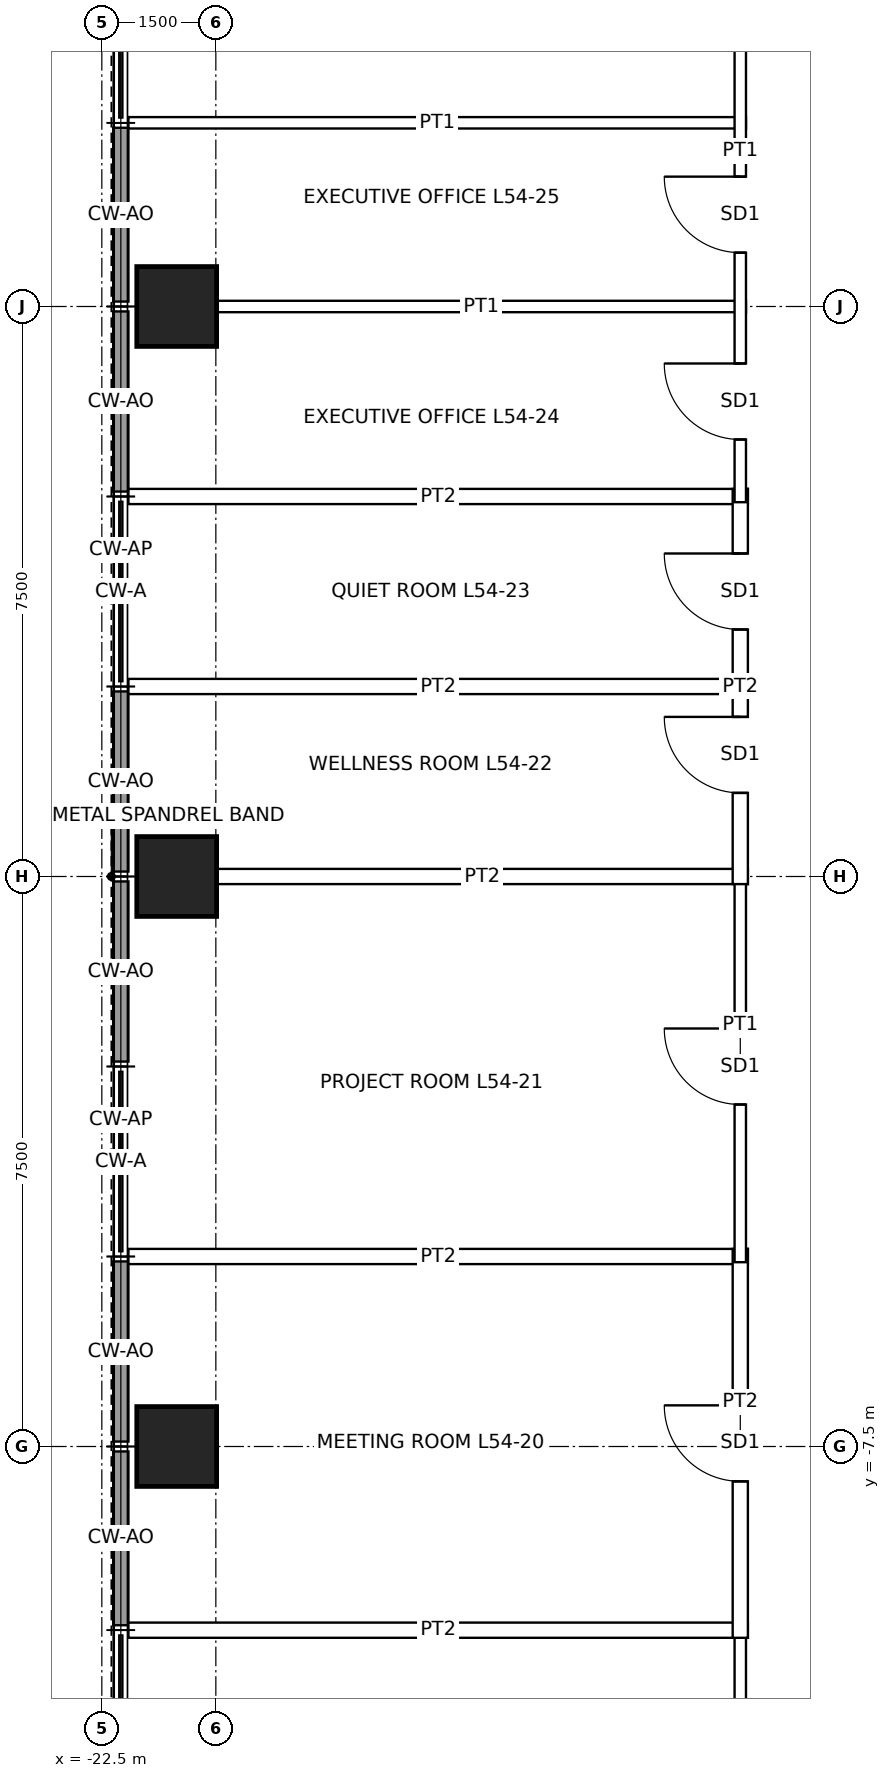
"""IFC4 building model, lengths in metres.
Left out: names, types, materials, properties, quantities, classifications, styles, units other than length and angle.
Written with IfcOpenShell. Run it as: python <this file> out.ifc"""

import sys

from ifc_helpers import new_model, si_unit, direction, frame, frame_2d, origin, origin_2d, place, context, subcontext, project, spatial, rectangle, hollow_rectangle, extrude, element, fill, save


model = new_model("IFC4")
c1 = context("Model", 3, precision=1e-05, world=origin(), true_north=direction((0.0, 1.0)))
c2 = subcontext(c1, "Body", "Model", "MODEL_VIEW")
j1 = project(units=[si_unit("LENGTHUNIT", "METRE"), si_unit("PLANEANGLEUNIT", "RADIAN")], contexts=[c1])
p1 = place(None, origin())
s1 = spatial("IfcSite", under=j1, at=p1, CompositionType="ELEMENT")
p2 = place(p1, origin())
s2 = spatial("IfcBuilding", under=s1, at=p2, CompositionType="ELEMENT")
p3 = place(p2, frame((0.0, 0.0, 249.9)))
s3 = spatial("IfcBuildingStorey", under=s2, at=p3, CompositionType="ELEMENT", Elevation=249.9)
for number, where, z_axis, x_axis in (
    (1, (-21.515, -7.5, 0.0), (0.0, 0.0, 1.0), (1.0, 0.0, 0.0)),
    (2, (-21.515, 0.0, 0.0), (0.0, 0.0, 1.0), (1.0, 0.0, 0.0)),
    (3, (-21.515, 7.5, 0.0), (0.0, 0.0, 1.0), (1.0, 0.0, 0.0)),
):
    element("IfcColumn", number, at=place(p3, frame(where, z_axis=z_axis, x_axis=x_axis)), inside=s3, PredefinedType="COLUMN", context=c2, shape_type="SweptSolid", body=[
        extrude(hollow_rectangle(XDim=1.05, YDim=1.05, WallThickness=0.07, at=origin_2d()), origin(), (0.0, 0.0, 1.0), 4.0),
    ])
p4 = place(p3, frame((-22.25, -9.852, 0.0), z_axis=(0.0, 0.0, 1.0), x_axis=(0.0, 1.0, 0.0)))
e4 = element("IfcWall", 4, at=p4, inside=s3, PredefinedType="SOLIDWALL", context=c2, shape_type="SweptSolid", body=[
    extrude(rectangle(XDim=2.287, YDim=0.2, at=frame_2d((1.144, 0.0))), origin(), (0.0, 0.0, 1.0), 3.75),
])
for number, where, z_axis, x_axis in (
    (5, (-22.25, -7.435, 0.0), (0.0, 0.0, 1.0), (0.0, 1.0, 0.0)),
    (6, (-22.25, -2.435, 0.0), (0.0, 0.0, 1.0), (0.0, 1.0, 0.0)),
    (7, (-22.25, 0.065, 0.0), (0.0, 0.0, 1.0), (0.0, 1.0, 0.0)),
    (8, (-22.25, 5.065, 0.0), (0.0, 0.0, 1.0), (0.0, 1.0, 0.0)),
):
    element("IfcWall", number, at=place(p3, frame(where, z_axis=z_axis, x_axis=x_axis)), inside=s3, PredefinedType="SOLIDWALL", context=c2, shape_type="SweptSolid", body=[
        extrude(rectangle(XDim=2.37, YDim=0.2, at=frame_2d((1.185, 0.0))), origin(), (0.0, 0.0, 1.0), 3.75),
    ])
p5 = place(p3, frame((-22.25, 7.565, 0.0), z_axis=(0.0, 0.0, 1.0), x_axis=(0.0, 1.0, 0.0)))
e9 = element("IfcWall", 9, at=p5, inside=s3, PredefinedType="SOLIDWALL", context=c2, shape_type="SweptSolid", body=[
    extrude(rectangle(XDim=2.287, YDim=0.2, at=frame_2d((1.144, 0.0))), origin(), (0.0, 0.0, 1.0), 3.75),
])
for number, where, z_axis, x_axis in (
    (10, (-22.15, -9.917, 0.0), (0.0, 0.0, 1.0), (1.0, 0.0, 0.0)),
    (11, (-22.15, -5.0, 0.0), (0.0, 0.0, 1.0), (1.0, 0.0, 0.0)),
):
    element("IfcWall", number, at=place(p3, frame(where, z_axis=z_axis, x_axis=x_axis)), inside=s3, PredefinedType="PARTITIONING", context=c2, shape_type="SweptSolid", body=[
        extrude(rectangle(XDim=8.15, YDim=0.2, at=frame_2d((4.075, 0.0))), origin(), (0.0, 0.0, 1.0), 3.75),
    ])
p6 = place(p3, frame((-20.99, 0.0, 0.0), z_axis=(0.0, 0.0, 1.0), x_axis=(1.0, 0.0, 0.0)))
e12 = element("IfcWall", 12, at=p6, inside=s3, PredefinedType="PARTITIONING", context=c2, shape_type="SweptSolid", body=[
    extrude(rectangle(XDim=6.99, YDim=0.2, at=frame_2d((3.495, 0.0))), origin(), (0.0, 0.0, 1.0), 3.75),
])
for number, where, z_axis, x_axis in (
    (13, (-22.15, 2.5, 0.0), (0.0, 0.0, 1.0), (1.0, 0.0, 0.0)),
    (14, (-22.15, 5.0, 0.0), (0.0, 0.0, 1.0), (1.0, 0.0, 0.0)),
):
    element("IfcWall", number, at=place(p3, frame(where, z_axis=z_axis, x_axis=x_axis)), inside=s3, PredefinedType="PARTITIONING", context=c2, shape_type="SweptSolid", body=[
        extrude(rectangle(XDim=8.15, YDim=0.2, at=frame_2d((4.075, 0.0))), origin(), (0.0, 0.0, 1.0), 3.75),
    ])
p7 = place(p3, frame((-20.99, 7.5, 0.0), z_axis=(0.0, 0.0, 1.0), x_axis=(1.0, 0.0, 0.0)))
e15 = element("IfcWall", 15, at=p7, inside=s3, PredefinedType="PARTITIONING", context=c2, shape_type="SweptSolid", body=[
    extrude(rectangle(XDim=6.965, YDim=0.15, at=frame_2d((3.482, 0.0))), origin(), (0.0, 0.0, 1.0), 3.75),
])
p8 = place(p3, frame((-22.15, 9.917, 0.0), z_axis=(0.0, 0.0, 1.0), x_axis=(1.0, 0.0, 0.0)))
e16 = element("IfcWall", 16, at=p8, inside=s3, PredefinedType="PARTITIONING", context=c2, shape_type="SweptSolid", body=[
    extrude(rectangle(XDim=8.125, YDim=0.15, at=frame_2d((4.062, 0.0))), origin(), (0.0, 0.0, 1.0), 3.75),
])
p9 = place(p3, frame((-14.1, -14.175, 0.0), z_axis=(0.0, 0.0, 1.0), x_axis=(0.0, 1.0, 0.0)))
e17 = element("IfcWall", 17, at=p9, inside=s3, PredefinedType="PARTITIONING", context=c2, shape_type="SweptSolid", body=[
    extrude(rectangle(XDim=4.333, YDim=0.15, at=frame_2d((2.167, 0.0))), origin(), (0.0, 0.0, 1.0), 3.75),
])
p10 = place(p3, frame((-14.1, -10.017, 0.0), z_axis=(0.0, 0.0, 1.0), x_axis=(0.0, 1.0, 0.0)))
e18 = element("IfcWall", 18, at=p10, inside=s3, PredefinedType="PARTITIONING", context=c2, shape_type="SweptSolid", body=[
    extrude(rectangle(XDim=5.117, YDim=0.2, at=frame_2d((2.559, 0.0))), origin(), (0.0, 0.0, 1.0), 3.75),
])
p11 = place(p10, frame((2.059, 0.0, 0.0)))
e19 = element("IfcOpeningElement", 19, at=p11, cuts=e18, PredefinedType="OPENING", context=c2, shape_type="SweptSolid", body=[
    extrude(rectangle(XDim=1.0, YDim=2.4, at=frame_2d((0.5, 1.2))), frame((0.0, 0.11, 0.0), z_axis=(0.0, -1.0, 0.0), x_axis=(1.0, 0.0, 0.0)), (0.0, 0.0, 1.0), 0.22),
])
p12 = place(p3, frame((-14.1, -5.075, 0.0), z_axis=(0.0, 0.0, 1.0), x_axis=(0.0, 1.0, 0.0)))
e20 = element("IfcWall", 20, at=p12, inside=s3, PredefinedType="PARTITIONING", context=c2, shape_type="SweptSolid", body=[
    extrude(rectangle(XDim=5.15, YDim=0.15, at=frame_2d((2.575, 0.0))), origin(), (0.0, 0.0, 1.0), 3.75),
])
p13 = place(p12, frame((2.075, 0.0, 0.0)))
e21 = element("IfcOpeningElement", 21, at=p13, cuts=e20, PredefinedType="OPENING", context=c2, shape_type="SweptSolid", body=[
    extrude(rectangle(XDim=1.0, YDim=2.4, at=frame_2d((0.5, 1.2))), frame((0.0, 0.085, 0.0), z_axis=(0.0, -1.0, 0.0), x_axis=(1.0, 0.0, 0.0)), (0.0, 0.0, 1.0), 0.17),
])
p14 = place(p3, frame((-14.1, -0.1, 0.0), z_axis=(0.0, 0.0, 1.0), x_axis=(0.0, 1.0, 0.0)))
e22 = element("IfcWall", 22, at=p14, inside=s3, PredefinedType="PARTITIONING", context=c2, shape_type="SweptSolid", body=[
    extrude(rectangle(XDim=5.2, YDim=0.2, at=frame_2d((2.6, 0.0))), origin(), (0.0, 0.0, 1.0), 3.75),
])
p15 = place(p14, frame((1.2, 0.0, 0.0)))
e23 = element("IfcOpeningElement", 23, at=p15, cuts=e22, PredefinedType="OPENING", context=c2, shape_type="SweptSolid", body=[
    extrude(rectangle(XDim=1.0, YDim=2.4, at=frame_2d((0.5, 1.2))), frame((0.0, 0.11, 0.0), z_axis=(0.0, -1.0, 0.0), x_axis=(1.0, 0.0, 0.0)), (0.0, 0.0, 1.0), 0.22),
])
p16 = place(p14, frame((3.35, 0.0, 0.0)))
e24 = element("IfcOpeningElement", 24, at=p16, cuts=e22, PredefinedType="OPENING", context=c2, shape_type="SweptSolid", body=[
    extrude(rectangle(XDim=1.0, YDim=2.4, at=frame_2d((0.5, 1.2))), frame((0.0, 0.11, 0.0), z_axis=(0.0, -1.0, 0.0), x_axis=(1.0, 0.0, 0.0)), (0.0, 0.0, 1.0), 0.22),
])
p17 = place(p3, frame((-14.1, 4.925, 0.0), z_axis=(0.0, 0.0, 1.0), x_axis=(0.0, 1.0, 0.0)))
e25 = element("IfcWall", 25, at=p17, inside=s3, PredefinedType="PARTITIONING", context=c2, shape_type="SweptSolid", body=[
    extrude(rectangle(XDim=9.25, YDim=0.15, at=frame_2d((4.625, 0.0))), origin(), (0.0, 0.0, 1.0), 3.75),
])
p18 = place(p17, frame((0.825, 0.0, 0.0)))
e26 = element("IfcOpeningElement", 26, at=p18, cuts=e25, PredefinedType="OPENING", context=c2, shape_type="SweptSolid", body=[
    extrude(rectangle(XDim=1.0, YDim=2.4, at=frame_2d((0.5, 1.2))), frame((0.0, 0.085, 0.0), z_axis=(0.0, -1.0, 0.0), x_axis=(1.0, 0.0, 0.0)), (0.0, 0.0, 1.0), 0.17),
])
p19 = place(p17, frame((3.283, 0.0, 0.0)))
e27 = element("IfcOpeningElement", 27, at=p19, cuts=e25, PredefinedType="OPENING", context=c2, shape_type="SweptSolid", body=[
    extrude(rectangle(XDim=1.0, YDim=2.4, at=frame_2d((0.5, 1.2))), frame((0.0, 0.085, 0.0), z_axis=(0.0, -1.0, 0.0), x_axis=(1.0, 0.0, 0.0)), (0.0, 0.0, 1.0), 0.17),
])
p20 = place(p11, origin())
e28 = element("IfcDoor", 28, at=p20, inside=s3, OperationType="SINGLE_SWING_RIGHT", PredefinedType="DOOR", context=c2, shape_type="SweptSolid", body=[
    extrude(rectangle(XDim=1.0, YDim=2.4, at=frame_2d((0.5, 1.2))), frame((0.0, 0.025, 0.0), z_axis=(0.0, -1.0, 0.0), x_axis=(1.0, 0.0, 0.0)), (0.0, 0.0, 1.0), 0.05),
])
fill(e19, e28)
p21 = place(p13, origin())
e29 = element("IfcDoor", 29, at=p21, inside=s3, OperationType="SINGLE_SWING_RIGHT", PredefinedType="DOOR", context=c2, shape_type="SweptSolid", body=[
    extrude(rectangle(XDim=1.0, YDim=2.4, at=frame_2d((0.5, 1.2))), frame((0.0, 0.025, 0.0), z_axis=(0.0, -1.0, 0.0), x_axis=(1.0, 0.0, 0.0)), (0.0, 0.0, 1.0), 0.05),
])
fill(e21, e29)
p22 = place(p15, origin())
e30 = element("IfcDoor", 30, at=p22, inside=s3, OperationType="SINGLE_SWING_RIGHT", PredefinedType="DOOR", context=c2, shape_type="SweptSolid", body=[
    extrude(rectangle(XDim=1.0, YDim=2.4, at=frame_2d((0.5, 1.2))), frame((0.0, 0.025, 0.0), z_axis=(0.0, -1.0, 0.0), x_axis=(1.0, 0.0, 0.0)), (0.0, 0.0, 1.0), 0.05),
])
fill(e23, e30)
p23 = place(p16, origin())
e31 = element("IfcDoor", 31, at=p23, inside=s3, OperationType="SINGLE_SWING_RIGHT", PredefinedType="DOOR", context=c2, shape_type="SweptSolid", body=[
    extrude(rectangle(XDim=1.0, YDim=2.4, at=frame_2d((0.5, 1.2))), frame((0.0, 0.025, 0.0), z_axis=(0.0, -1.0, 0.0), x_axis=(1.0, 0.0, 0.0)), (0.0, 0.0, 1.0), 0.05),
])
fill(e24, e31)
p24 = place(p18, origin())
e32 = element("IfcDoor", 32, at=p24, inside=s3, OperationType="SINGLE_SWING_RIGHT", PredefinedType="DOOR", context=c2, shape_type="SweptSolid", body=[
    extrude(rectangle(XDim=1.0, YDim=2.4, at=frame_2d((0.5, 1.2))), frame((0.0, 0.025, 0.0), z_axis=(0.0, -1.0, 0.0), x_axis=(1.0, 0.0, 0.0)), (0.0, 0.0, 1.0), 0.05),
])
fill(e26, e32)
p25 = place(p19, origin())
e33 = element("IfcDoor", 33, at=p25, inside=s3, OperationType="SINGLE_SWING_RIGHT", PredefinedType="DOOR", context=c2, shape_type="SweptSolid", body=[
    extrude(rectangle(XDim=1.0, YDim=2.4, at=frame_2d((0.5, 1.2))), frame((0.0, 0.025, 0.0), z_axis=(0.0, -1.0, 0.0), x_axis=(1.0, 0.0, 0.0)), (0.0, 0.0, 1.0), 0.05),
])
fill(e27, e33)
save(model, sys.argv[1])
